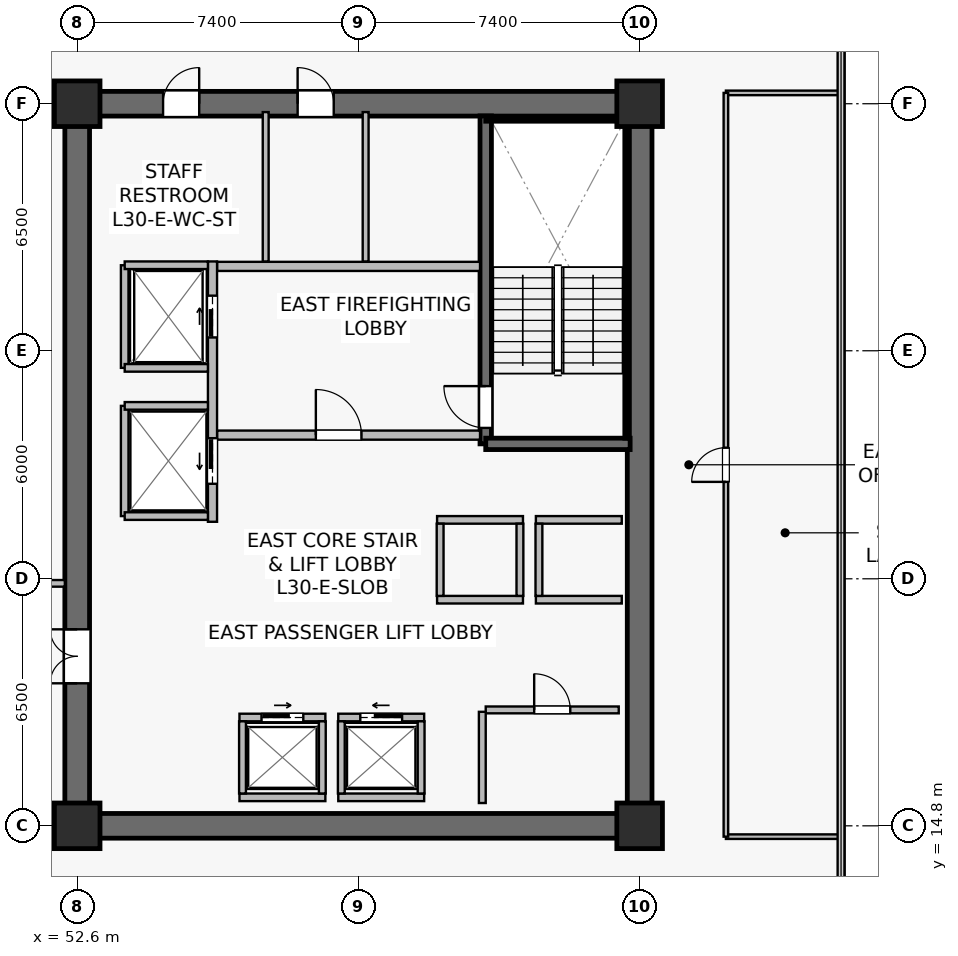
"""IFC4 building model, lengths in metres.
Left out: names, types, materials, properties, quantities, classifications, styles, units other than length and angle.
Written with IfcOpenShell. Run it as: python <this file> out.ifc"""

import sys

from ifc_helpers import new_model, si_unit, direction, frame, frame_2d, origin, origin_2d, place, context, subcontext, project, spatial, rectangle, extrude, source, transform, mapped, element, fill, save


model = new_model("IFC4")
c1 = context("Model", 3, precision=1e-05, world=origin(), true_north=direction((0.0, 1.0)))
c2 = subcontext(c1, "Body", "Model", "MODEL_VIEW")
j1 = project(units=[si_unit("LENGTHUNIT", "METRE"), si_unit("PLANEANGLEUNIT", "RADIAN")], contexts=[c1])
p1 = place(None, origin())
s1 = spatial("IfcSite", under=j1, at=p1, CompositionType="ELEMENT")
p2 = place(p1, origin())
s2 = spatial("IfcBuilding", under=s1, at=p2, CompositionType="ELEMENT")
p3 = place(p2, frame((0.0, 0.0, 125.6)))
s3 = spatial("IfcBuildingStorey", under=s2, at=p3, CompositionType="ELEMENT", Elevation=125.6)
p4 = place(p3, frame((52.275, 14.8, 0.0), z_axis=(0.0, 0.0, 1.0), x_axis=(1.0, 0.0, 0.0)))
e1 = element("IfcWall", 1, at=p4, inside=s3, PredefinedType="SHEAR", context=c2, shape_type="SweptSolid", body=[
    extrude(rectangle(XDim=15.45, YDim=0.65, at=frame_2d((7.725, 0.0))), origin(), (0.0, 0.0, 1.0), 3.79),
])
p5 = place(p3, frame((52.275, 33.8, 0.0), z_axis=(0.0, 0.0, 1.0), x_axis=(1.0, 0.0, 0.0)))
e2 = element("IfcWall", 2, at=p5, inside=s3, PredefinedType="SHEAR", context=c2, shape_type="SweptSolid", body=[
    extrude(rectangle(XDim=15.45, YDim=0.65, at=frame_2d((7.725, 0.0))), origin(), (0.0, 0.0, 1.0), 3.79),
])
p6 = place(p5, frame((6.125, 0.0, 0.0)))
e3 = element("IfcOpeningElement", 3, at=p6, cuts=e2, PredefinedType="OPENING", context=c2, shape_type="SweptSolid", body=[
    extrude(rectangle(XDim=0.95, YDim=2.15, at=frame_2d((0.475, 1.075))), frame((0.0, 0.335, 0.0), z_axis=(0.0, -1.0, 0.0), x_axis=(1.0, 0.0, 0.0)), (0.0, 0.0, 1.0), 0.67),
])
p7 = place(p5, frame((2.585, 0.0, 0.0)))
e4 = element("IfcOpeningElement", 4, at=p7, cuts=e2, PredefinedType="OPENING", context=c2, shape_type="SweptSolid", body=[
    extrude(rectangle(XDim=0.95, YDim=2.15, at=frame_2d((0.475, 1.075))), frame((0.0, 0.335, 0.0), z_axis=(0.0, -1.0, 0.0), x_axis=(1.0, 0.0, 0.0)), (0.0, 0.0, 1.0), 0.67),
])
p8 = place(p3, frame((52.6, 15.125, 0.0), z_axis=(0.0, 0.0, 1.0), x_axis=(0.0, 1.0, 0.0)))
e5 = element("IfcWall", 5, at=p8, inside=s3, PredefinedType="SHEAR", context=c2, shape_type="SweptSolid", body=[
    extrude(rectangle(XDim=18.35, YDim=0.65, at=frame_2d((9.175, 0.0))), origin(), (0.0, 0.0, 1.0), 3.79),
])
p9 = place(p8, frame((3.425, 0.0, 0.0)))
e6 = element("IfcOpeningElement", 6, at=p9, cuts=e5, PredefinedType="OPENING", context=c2, shape_type="SweptSolid", body=[
    extrude(rectangle(XDim=1.42, YDim=2.2, at=frame_2d((0.71, 1.1))), frame((0.0, 0.335, 0.0), z_axis=(0.0, -1.0, 0.0), x_axis=(1.0, 0.0, 0.0)), (0.0, 0.0, 1.0), 0.67),
])
p10 = place(p3, frame((67.4, 15.125, 0.0), z_axis=(0.0, 0.0, 1.0), x_axis=(0.0, 1.0, 0.0)))
e7 = element("IfcWall", 7, at=p10, inside=s3, PredefinedType="SHEAR", context=c2, shape_type="SweptSolid", body=[
    extrude(rectangle(XDim=18.35, YDim=0.65, at=frame_2d((9.175, 0.0))), origin(), (0.0, 0.0, 1.0), 3.79),
])
p11 = place(p3, frame((63.35, 24.85, 0.0), z_axis=(0.0, 0.0, 1.0), x_axis=(0.0, 1.0, 0.0)))
e8 = element("IfcWall", 8, at=p11, inside=s3, PredefinedType="SHEAR", context=c2, shape_type="SweptSolid", body=[
    extrude(rectangle(XDim=8.63, YDim=0.3, at=frame_2d((4.315, 0.0))), origin(), (0.0, 0.0, 1.0), 3.79),
])
p12 = place(p11, frame((0.42, 0.0, 0.0)))
e9 = element("IfcOpeningElement", 9, at=p12, cuts=e8, PredefinedType="OPENING", context=c2, shape_type="SweptSolid", body=[
    extrude(rectangle(XDim=1.1, YDim=2.15, at=frame_2d((0.55, 1.075))), frame((0.0, 0.16, 0.0), z_axis=(0.0, -1.0, 0.0), x_axis=(1.0, 0.0, 0.0)), (0.0, 0.0, 1.0), 0.32),
])
p13 = place(p3, frame((63.35, 24.85, 0.0), z_axis=(0.0, 0.0, 1.0), x_axis=(1.0, 0.0, 0.0)))
e10 = element("IfcWall", 10, at=p13, inside=s3, PredefinedType="SHEAR", context=c2, shape_type="SweptSolid", body=[
    extrude(rectangle(XDim=3.8, YDim=0.3, at=frame_2d((1.9, 0.0))), origin(), (0.0, 0.0, 1.0), 3.79),
])
p14 = place(p3, frame((63.35, 33.4, 0.0), z_axis=(0.0, 0.0, 1.0), x_axis=(1.0, 0.0, 0.0)))
e11 = element("IfcWall", 11, at=p14, inside=s3, PredefinedType="SOLIDWALL", context=c2, shape_type="SweptSolid", body=[
    extrude(rectangle(XDim=3.72, YDim=0.12, at=frame_2d((1.86, 0.0))), origin(), (0.0, 0.0, 1.0), 3.79),
])
p15 = place(p3, frame((67.07, 25.0, 0.0), z_axis=(0.0, 0.0, 1.0), x_axis=(0.0, 1.0, 0.0)))
e12 = element("IfcWall", 12, at=p15, inside=s3, PredefinedType="SOLIDWALL", context=c2, shape_type="SweptSolid", body=[
    extrude(rectangle(XDim=8.32, YDim=0.12, at=frame_2d((4.16, 0.0))), origin(), (0.0, 0.0, 1.0), 3.79),
])
m1 = source(origin(), c2, "Body", "SweptSolid", [
    extrude(rectangle(XDim=1.2, YDim=1.2, at=origin_2d()), origin(), (0.0, 0.0, 1.0), 4.1),
])
for number, where, z_axis, x_axis in (
    (13, (52.6, 14.8, 0.0), (0.0, 0.0, 1.0), (1.0, 0.0, 0.0)),
    (14, (67.4, 14.8, 0.0), (0.0, 0.0, 1.0), (1.0, 0.0, 0.0)),
    (15, (52.6, 33.8, 0.0), (0.0, 0.0, 1.0), (1.0, 0.0, 0.0)),
    (16, (67.4, 33.8, 0.0), (0.0, 0.0, 1.0), (1.0, 0.0, 0.0)),
):
    element("IfcColumn", number, at=place(p3, frame(where, z_axis=z_axis, x_axis=x_axis)), inside=s3, PredefinedType="COLUMN", context=c2, shape_type="MappedRepresentation", body=[
        mapped(m1, transform((0.0, 0.0, 0.0), scale=1.0)),
    ])
p16 = place(p3, frame((56.28, 25.08, 0.0), z_axis=(0.0, 0.0, 1.0), x_axis=(1.0, 0.0, 0.0)))
e17 = element("IfcWall", 17, at=p16, inside=s3, PredefinedType="SOLIDWALL", context=c2, shape_type="SweptSolid", body=[
    extrude(rectangle(XDim=6.92, YDim=0.24, at=frame_2d((3.46, 0.0))), origin(), (0.0, 0.0, 1.0), 3.125),
])
p17 = place(p16, frame((2.6, 0.0, 0.0)))
e18 = element("IfcOpeningElement", 18, at=p17, cuts=e17, PredefinedType="OPENING", context=c2, shape_type="SweptSolid", body=[
    extrude(rectangle(XDim=1.2, YDim=2.16, at=frame_2d((0.6, 1.08))), frame((0.0, 0.13, 0.0), z_axis=(0.0, -1.0, 0.0), x_axis=(1.0, 0.0, 0.0)), (0.0, 0.0, 1.0), 0.26),
])
p18 = place(p3, frame((56.28, 29.52, 0.0), z_axis=(0.0, 0.0, 1.0), x_axis=(1.0, 0.0, 0.0)))
e19 = element("IfcWall", 19, at=p18, inside=s3, PredefinedType="SOLIDWALL", context=c2, shape_type="SweptSolid", body=[
    extrude(rectangle(XDim=6.92, YDim=0.24, at=frame_2d((3.46, 0.0))), origin(), (0.0, 0.0, 1.0), 3.125),
])
p19 = place(p3, frame((56.16, 22.8, 0.0), z_axis=(0.0, 0.0, 1.0), x_axis=(0.0, 1.0, 0.0)))
e20 = element("IfcWall", 20, at=p19, inside=s3, PredefinedType="SOLIDWALL", context=c2, shape_type="SweptSolid", body=[
    extrude(rectangle(XDim=6.85, YDim=0.24, at=frame_2d((3.425, 0.0))), origin(), (0.0, 0.0, 1.0), 2.875),
])
p20 = place(p19, frame((4.85, 0.0, 0.0)))
e21 = element("IfcOpeningElement", 21, at=p20, cuts=e20, PredefinedType="OPENING", context=c2, shape_type="SweptSolid", body=[
    extrude(rectangle(XDim=1.1, YDim=2.22, at=frame_2d((0.55, 1.11))), frame((0.0, 0.13, 0.0), z_axis=(0.0, -1.0, 0.0), x_axis=(1.0, 0.0, 0.0)), (0.0, 0.0, 1.0), 0.26),
])
p21 = place(p19, frame((1.0, 0.0, 0.0)))
e22 = element("IfcOpeningElement", 22, at=p21, cuts=e20, PredefinedType="OPENING", context=c2, shape_type="SweptSolid", body=[
    extrude(rectangle(XDim=1.2, YDim=2.22, at=frame_2d((0.6, 1.11))), frame((0.0, 0.13, 0.0), z_axis=(0.0, -1.0, 0.0), x_axis=(1.0, 0.0, 0.0)), (0.0, 0.0, 1.0), 0.26),
])
p22 = place(p3, frame((59.47, 17.65, 0.0), z_axis=(0.0, 0.0, 1.0), x_axis=(1.0, 0.0, 0.0)))
e23 = element("IfcWall", 23, at=p22, inside=s3, PredefinedType="SOLIDWALL", context=c2, shape_type="SweptSolid", body=[
    extrude(rectangle(XDim=2.26, YDim=0.2, at=frame_2d((1.13, 0.0))), origin(), (0.0, 0.0, 1.0), 3.125),
])
p23 = place(p22, frame((0.58, 0.0, 0.0)))
e24 = element("IfcOpeningElement", 24, at=p23, cuts=e23, PredefinedType="OPENING", context=c2, shape_type="SweptSolid", body=[
    extrude(rectangle(XDim=1.1, YDim=2.22, at=frame_2d((0.55, 1.11))), frame((0.0, 0.11, 0.0), z_axis=(0.0, -1.0, 0.0), x_axis=(1.0, 0.0, 0.0)), (0.0, 0.0, 1.0), 0.22),
])
p24 = place(p3, frame((59.47, 15.55, 0.0), z_axis=(0.0, 0.0, 1.0), x_axis=(1.0, 0.0, 0.0)))
e25 = element("IfcWall", 25, at=p24, inside=s3, PredefinedType="SOLIDWALL", context=c2, shape_type="SweptSolid", body=[
    extrude(rectangle(XDim=2.26, YDim=0.2, at=frame_2d((1.13, 0.0))), origin(), (0.0, 0.0, 1.0), 3.125),
])
for number, where, z_axis, x_axis in (
    (26, (59.55, 15.65, 0.0), (0.0, 0.0, 1.0), (0.0, 1.0, 0.0)),
    (27, (61.65, 15.65, 0.0), (0.0, 0.0, 1.0), (0.0, 1.0, 0.0)),
):
    element("IfcWall", number, at=place(p3, frame(where, z_axis=z_axis, x_axis=x_axis)), inside=s3, PredefinedType="SOLIDWALL", context=c2, shape_type="SweptSolid", body=[
        extrude(rectangle(XDim=1.9, YDim=0.18, at=frame_2d((0.95, 0.0))), origin(), (0.0, 0.0, 1.0), 3.79),
    ])
p25 = place(p3, frame((56.87, 17.65, 0.0), z_axis=(0.0, 0.0, 1.0), x_axis=(1.0, 0.0, 0.0)))
e28 = element("IfcWall", 28, at=p25, inside=s3, PredefinedType="SOLIDWALL", context=c2, shape_type="SweptSolid", body=[
    extrude(rectangle(XDim=2.26, YDim=0.2, at=frame_2d((1.13, 0.0))), origin(), (0.0, 0.0, 1.0), 3.79),
])
p26 = place(p25, frame((0.58, 0.0, 0.0)))
e29 = element("IfcOpeningElement", 29, at=p26, cuts=e28, PredefinedType="OPENING", context=c2, shape_type="SweptSolid", body=[
    extrude(rectangle(XDim=1.1, YDim=2.22, at=frame_2d((0.55, 1.11))), frame((0.0, 0.11, 0.0), z_axis=(0.0, -1.0, 0.0), x_axis=(1.0, 0.0, 0.0)), (0.0, 0.0, 1.0), 0.22),
])
p27 = place(p3, frame((56.87, 15.55, 0.0), z_axis=(0.0, 0.0, 1.0), x_axis=(1.0, 0.0, 0.0)))
e30 = element("IfcWall", 30, at=p27, inside=s3, PredefinedType="SOLIDWALL", context=c2, shape_type="SweptSolid", body=[
    extrude(rectangle(XDim=2.26, YDim=0.2, at=frame_2d((1.13, 0.0))), origin(), (0.0, 0.0, 1.0), 3.79),
])
for number, where, z_axis, x_axis in (
    (31, (56.95, 15.65, 0.0), (0.0, 0.0, 1.0), (0.0, 1.0, 0.0)),
    (32, (59.05, 15.65, 0.0), (0.0, 0.0, 1.0), (0.0, 1.0, 0.0)),
):
    element("IfcWall", number, at=place(p3, frame(where, z_axis=z_axis, x_axis=x_axis)), inside=s3, PredefinedType="SOLIDWALL", context=c2, shape_type="SweptSolid", body=[
        extrude(rectangle(XDim=1.9, YDim=0.18, at=frame_2d((0.95, 0.0))), origin(), (0.0, 0.0, 1.0), 3.79),
    ])
for number, where, z_axis, x_axis in (
    (33, (64.67, 20.75, 0.0), (0.0, 0.0, 1.0), (1.0, 0.0, 0.0)),
    (34, (64.67, 22.85, 0.0), (0.0, 0.0, 1.0), (1.0, 0.0, 0.0)),
):
    element("IfcWall", number, at=place(p3, frame(where, z_axis=z_axis, x_axis=x_axis)), inside=s3, PredefinedType="SOLIDWALL", context=c2, shape_type="SweptSolid", body=[
        extrude(rectangle(XDim=2.26, YDim=0.2, at=frame_2d((1.13, 0.0))), origin(), (0.0, 0.0, 1.0), 3.79),
    ])
p28 = place(p3, frame((64.75, 20.85, 0.0), z_axis=(0.0, 0.0, 1.0), x_axis=(0.0, 1.0, 0.0)))
e35 = element("IfcWall", 35, at=p28, inside=s3, PredefinedType="SOLIDWALL", context=c2, shape_type="SweptSolid", body=[
    extrude(rectangle(XDim=1.9, YDim=0.18, at=frame_2d((0.95, 0.0))), origin(), (0.0, 0.0, 1.0), 3.79),
])
for number, where, z_axis, x_axis in (
    (36, (62.07, 20.75, 0.0), (0.0, 0.0, 1.0), (1.0, 0.0, 0.0)),
    (37, (62.07, 22.85, 0.0), (0.0, 0.0, 1.0), (1.0, 0.0, 0.0)),
):
    element("IfcWall", number, at=place(p3, frame(where, z_axis=z_axis, x_axis=x_axis)), inside=s3, PredefinedType="SOLIDWALL", context=c2, shape_type="SweptSolid", body=[
        extrude(rectangle(XDim=2.26, YDim=0.2, at=frame_2d((1.13, 0.0))), origin(), (0.0, 0.0, 1.0), 3.79),
    ])
for number, where, z_axis, x_axis in (
    (38, (62.15, 20.85, 0.0), (0.0, 0.0, 1.0), (0.0, 1.0, 0.0)),
    (39, (64.25, 20.85, 0.0), (0.0, 0.0, 1.0), (0.0, 1.0, 0.0)),
):
    element("IfcWall", number, at=place(p3, frame(where, z_axis=z_axis, x_axis=x_axis)), inside=s3, PredefinedType="SOLIDWALL", context=c2, shape_type="SweptSolid", body=[
        extrude(rectangle(XDim=1.9, YDim=0.18, at=frame_2d((0.95, 0.0))), origin(), (0.0, 0.0, 1.0), 3.79),
    ])
p29 = place(p3, frame((53.85, 26.85, 0.0), z_axis=(0.0, 0.0, 1.0), x_axis=(0.0, 1.0, 0.0)))
e40 = element("IfcWall", 40, at=p29, inside=s3, PredefinedType="SOLIDWALL", context=c2, shape_type="SweptSolid", body=[
    extrude(rectangle(XDim=2.7, YDim=0.2, at=frame_2d((1.35, 0.0))), origin(), (0.0, 0.0, 1.0), 3.79),
])
p30 = place(p3, frame((53.85, 29.55, 0.0), z_axis=(0.0, 0.0, 1.0), x_axis=(1.0, 0.0, 0.0)))
e41 = element("IfcWall", 41, at=p30, inside=s3, PredefinedType="SOLIDWALL", context=c2, shape_type="SweptSolid", body=[
    extrude(rectangle(XDim=2.19, YDim=0.2, at=frame_2d((1.095, 0.0))), origin(), (0.0, 0.0, 1.0), 3.79),
])
p31 = place(p3, frame((53.85, 26.85, 0.0), z_axis=(0.0, 0.0, 1.0), x_axis=(1.0, 0.0, 0.0)))
e42 = element("IfcWall", 42, at=p31, inside=s3, PredefinedType="SOLIDWALL", context=c2, shape_type="SweptSolid", body=[
    extrude(rectangle(XDim=2.19, YDim=0.2, at=frame_2d((1.095, 0.0))), origin(), (0.0, 0.0, 1.0), 3.187),
])
p32 = place(p3, frame((53.85, 22.95, 0.0), z_axis=(0.0, 0.0, 1.0), x_axis=(0.0, 1.0, 0.0)))
e43 = element("IfcWall", 43, at=p32, inside=s3, PredefinedType="SOLIDWALL", context=c2, shape_type="SweptSolid", body=[
    extrude(rectangle(XDim=2.9, YDim=0.2, at=frame_2d((1.45, 0.0))), origin(), (0.0, 0.0, 1.0), 2.875),
])
for number, where, z_axis, x_axis in (
    (44, (53.85, 25.85, 0.0), (0.0, 0.0, 1.0), (1.0, 0.0, 0.0)),
    (45, (53.85, 22.95, 0.0), (0.0, 0.0, 1.0), (1.0, 0.0, 0.0)),
):
    element("IfcWall", number, at=place(p3, frame(where, z_axis=z_axis, x_axis=x_axis)), inside=s3, PredefinedType="SOLIDWALL", context=c2, shape_type="SweptSolid", body=[
        extrude(rectangle(XDim=2.19, YDim=0.2, at=frame_2d((1.095, 0.0))), origin(), (0.0, 0.0, 1.0), 3.79),
    ])
p33 = place(p3, frame((63.35, 17.85, 0.0), z_axis=(0.0, 0.0, 1.0), x_axis=(1.0, 0.0, 0.0)))
e46 = element("IfcWall", 46, at=p33, inside=s3, PredefinedType="SOLIDWALL", context=c2, shape_type="SweptSolid", body=[
    extrude(rectangle(XDim=3.5, YDim=0.18, at=frame_2d((1.75, 0.0))), origin(), (0.0, 0.0, 1.0), 3.79),
])
p34 = place(p33, frame((1.275, 0.0, 0.0)))
e47 = element("IfcOpeningElement", 47, at=p34, cuts=e46, PredefinedType="OPENING", context=c2, shape_type="SweptSolid", body=[
    extrude(rectangle(XDim=0.95, YDim=2.15, at=frame_2d((0.475, 1.075))), frame((0.0, 0.1, 0.0), z_axis=(0.0, -1.0, 0.0), x_axis=(1.0, 0.0, 0.0)), (0.0, 0.0, 1.0), 0.2),
])
p35 = place(p3, frame((63.26, 15.4, 0.0), z_axis=(0.0, 0.0, 1.0), x_axis=(0.0, 1.0, 0.0)))
e48 = element("IfcWall", 48, at=p35, inside=s3, PredefinedType="SOLIDWALL", context=c2, shape_type="SweptSolid", body=[
    extrude(rectangle(XDim=2.4, YDim=0.18, at=frame_2d((1.2, 0.0))), origin(), (0.0, 0.0, 1.0), 3.79),
])
p36 = place(p3, frame((60.19, 29.65, 0.0), z_axis=(0.0, 0.0, 1.0), x_axis=(0.0, 1.0, 0.0)))
e49 = element("IfcWall", 49, at=p36, inside=s3, PredefinedType="PLUMBINGWALL", context=c2, shape_type="SweptSolid", body=[
    extrude(rectangle(XDim=3.93, YDim=0.155, at=frame_2d((1.965, 0.0))), origin(), (0.0, 0.0, 1.0), 3.125),
])
p37 = place(p3, frame((57.56, 29.65, 0.0), z_axis=(0.0, 0.0, 1.0), x_axis=(0.0, 1.0, 0.0)))
e50 = element("IfcWall", 50, at=p37, inside=s3, PredefinedType="PLUMBINGWALL", context=c2, shape_type="SweptSolid", body=[
    extrude(rectangle(XDim=3.93, YDim=0.155, at=frame_2d((1.965, 0.0))), origin(), (0.0, 0.0, 1.0), 3.79),
])
p38 = place(p3, frame((48.3, 34.26, 0.0), z_axis=(0.0, 0.0, 1.0), x_axis=(1.0, 0.0, 0.0)))
e51 = element("IfcWall", 51, at=p38, inside=s3, PredefinedType="PARTITIONING", context=c2, shape_type="SweptSolid", body=[
    extrude(rectangle(XDim=3.975, YDim=0.175, at=frame_2d((1.987, 0.0))), origin(), (0.0, 0.0, 1.0), 3.475),
])
p39 = place(p3, frame((48.3, 21.18, 0.0), z_axis=(0.0, 0.0, 1.0), x_axis=(1.0, 0.0, 0.0)))
e52 = element("IfcWall", 52, at=p39, inside=s3, PredefinedType="PARTITIONING", context=c2, shape_type="SweptSolid", body=[
    extrude(rectangle(XDim=3.975, YDim=0.175, at=frame_2d((1.987, 0.0))), origin(), (0.0, 0.0, 1.0), 3.79),
])
p40 = place(p39, frame((1.35, 0.0, 0.0)))
e53 = element("IfcOpeningElement", 53, at=p40, cuts=e52, PredefinedType="OPENING", context=c2, shape_type="SweptSolid", body=[
    extrude(rectangle(XDim=0.95, YDim=2.15, at=frame_2d((0.475, 1.075))), frame((0.0, 0.098, 0.0), z_axis=(0.0, -1.0, 0.0), x_axis=(1.0, 0.0, 0.0)), (0.0, 0.0, 1.0), 0.195),
])
for number, where, z_axis, x_axis in (
    (54, (69.67, 14.515, 0.0), (0.0, 0.0, 1.0), (1.0, 0.0, 0.0)),
    (55, (69.67, 34.085, 0.0), (0.0, 0.0, 1.0), (1.0, 0.0, 0.0)),
):
    element("IfcWall", number, at=place(p3, frame(where, z_axis=z_axis, x_axis=x_axis)), inside=s3, PredefinedType="PARTITIONING", context=c2, shape_type="SweptSolid", body=[
        extrude(rectangle(XDim=3.02, YDim=0.12, at=frame_2d((1.51, 0.0))), origin(), (0.0, 0.0, 1.0), 3.79),
    ])
p41 = place(p3, frame((69.67, 14.515, 0.0), z_axis=(0.0, 0.0, 1.0), x_axis=(0.0, 1.0, 0.0)))
e56 = element("IfcWall", 56, at=p41, inside=s3, PredefinedType="PARTITIONING", context=c2, shape_type="SweptSolid", body=[
    extrude(rectangle(XDim=19.57, YDim=0.12, at=frame_2d((9.785, 0.0))), origin(), (0.0, 0.0, 1.0), 3.79),
])
p42 = place(p41, frame((9.335, 0.0, 0.0)))
e57 = element("IfcOpeningElement", 57, at=p42, cuts=e56, PredefinedType="OPENING", context=c2, shape_type="SweptSolid", body=[
    extrude(rectangle(XDim=0.9, YDim=2.1, at=frame_2d((0.45, 1.05))), frame((0.0, 0.07, 0.0), z_axis=(0.0, -1.0, 0.0), x_axis=(1.0, 0.0, 0.0)), (0.0, 0.0, 1.0), 0.14),
])
m2 = source(origin(), c2, "Body", "SweptSolid", [
    extrude(rectangle(XDim=1.1, YDim=2.15, at=frame_2d((0.55, 1.075))), frame((0.0, 0.025, 0.0), z_axis=(0.0, -1.0, 0.0), x_axis=(1.0, 0.0, 0.0)), (0.0, 0.0, 1.0), 0.05),
])
p43 = place(p12, origin())
e58 = element("IfcDoor", 58, at=p43, inside=s3, OperationType="SINGLE_SWING_RIGHT", PredefinedType="DOOR", context=c2, shape_type="MappedRepresentation", body=[
    mapped(m2, transform((0.0, 0.0, 0.0), scale=1.0)),
])
fill(e9, e58)
m3 = source(origin(), c2, "Body", "SweptSolid", [
    extrude(rectangle(XDim=1.2, YDim=2.16, at=frame_2d((0.6, 1.08))), frame((0.0, 0.025, 0.0), z_axis=(0.0, -1.0, 0.0), x_axis=(1.0, 0.0, 0.0)), (0.0, 0.0, 1.0), 0.05),
])
p44 = place(p17, origin())
e59 = element("IfcDoor", 59, at=p44, inside=s3, OperationType="SINGLE_SWING_LEFT", PredefinedType="DOOR", context=c2, shape_type="MappedRepresentation", body=[
    mapped(m3, transform((0.0, 0.0, 0.0), scale=1.0)),
])
fill(e18, e59)
m4 = source(origin(), c2, "Body", "SweptSolid", [
    extrude(rectangle(XDim=1.1, YDim=2.22, at=frame_2d((0.55, 1.11))), frame((0.0, 0.025, 0.0), z_axis=(0.0, -1.0, 0.0), x_axis=(1.0, 0.0, 0.0)), (0.0, 0.0, 1.0), 0.05),
])
p45 = place(p23, origin())
e60 = element("IfcDoor", 60, at=p45, inside=s3, OperationType="SLIDING_TO_LEFT", PredefinedType="USERDEFINED", context=c2, shape_type="MappedRepresentation", body=[
    mapped(m4, transform((0.0, 0.0, 0.0), scale=1.0)),
])
fill(e24, e60)
p46 = place(p26, origin())
e61 = element("IfcDoor", 61, at=p46, inside=s3, OperationType="SLIDING_TO_RIGHT", PredefinedType="USERDEFINED", context=c2, shape_type="MappedRepresentation", body=[
    mapped(m4, transform((0.0, 0.0, 0.0), scale=1.0)),
])
fill(e29, e61)
p47 = place(p20, origin())
e62 = element("IfcDoor", 62, at=p47, inside=s3, OperationType="SLIDING_TO_RIGHT", PredefinedType="USERDEFINED", context=c2, shape_type="MappedRepresentation", body=[
    mapped(m4, transform((0.0, 0.0, 0.0), scale=1.0)),
])
fill(e21, e62)
m5 = source(origin(), c2, "Body", "SweptSolid", [
    extrude(rectangle(XDim=1.2, YDim=2.22, at=frame_2d((0.6, 1.11))), frame((0.0, 0.025, 0.0), z_axis=(0.0, -1.0, 0.0), x_axis=(1.0, 0.0, 0.0)), (0.0, 0.0, 1.0), 0.05),
])
p48 = place(p21, origin())
e63 = element("IfcDoor", 63, at=p48, inside=s3, OperationType="SLIDING_TO_LEFT", PredefinedType="USERDEFINED", context=c2, shape_type="MappedRepresentation", body=[
    mapped(m5, transform((0.0, 0.0, 0.0), scale=1.0)),
])
fill(e22, e63)
m6 = source(origin(), c2, "Body", "SweptSolid", [
    extrude(rectangle(XDim=0.95, YDim=2.15, at=frame_2d((0.475, 1.075))), frame((0.0, 0.025, 0.0), z_axis=(0.0, -1.0, 0.0), x_axis=(1.0, 0.0, 0.0)), (0.0, 0.0, 1.0), 0.05),
])
p49 = place(p34, origin())
e64 = element("IfcDoor", 64, at=p49, inside=s3, OperationType="SINGLE_SWING_LEFT", PredefinedType="DOOR", context=c2, shape_type="MappedRepresentation", body=[
    mapped(m6, transform((0.0, 0.0, 0.0), scale=1.0)),
])
fill(e47, e64)
m7 = source(origin(), c2, "Body", "SweptSolid", [
    extrude(rectangle(XDim=1.42, YDim=2.2, at=frame_2d((0.71, 1.1))), frame((0.0, 0.025, 0.0), z_axis=(0.0, -1.0, 0.0), x_axis=(1.0, 0.0, 0.0)), (0.0, 0.0, 1.0), 0.05),
])
p50 = place(p9, origin())
e65 = element("IfcDoor", 65, at=p50, inside=s3, OperationType="DOUBLE_DOOR_SINGLE_SWING", PredefinedType="DOOR", context=c2, shape_type="MappedRepresentation", body=[
    mapped(m7, transform((0.0, 0.0, 0.0), scale=1.0)),
])
fill(e6, e65)
p51 = place(p6, origin())
e66 = element("IfcDoor", 66, at=p51, inside=s3, OperationType="SINGLE_SWING_LEFT", PredefinedType="DOOR", context=c2, shape_type="MappedRepresentation", body=[
    mapped(m6, transform((0.0, 0.0, 0.0), scale=1.0)),
])
fill(e3, e66)
p52 = place(p7, origin())
e67 = element("IfcDoor", 67, at=p52, inside=s3, OperationType="SINGLE_SWING_RIGHT", PredefinedType="DOOR", context=c2, shape_type="MappedRepresentation", body=[
    mapped(m6, transform((0.0, 0.0, 0.0), scale=1.0)),
])
fill(e4, e67)
m8 = source(origin(), c2, "Body", "SweptSolid", [
    extrude(rectangle(XDim=0.9, YDim=2.1, at=frame_2d((0.45, 1.05))), frame((0.0, 0.025, 0.0), z_axis=(0.0, -1.0, 0.0), x_axis=(1.0, 0.0, 0.0)), (0.0, 0.0, 1.0), 0.05),
])
p53 = place(p42, origin())
e68 = element("IfcDoor", 68, at=p53, inside=s3, OperationType="SINGLE_SWING_LEFT", PredefinedType="DOOR", context=c2, shape_type="MappedRepresentation", body=[
    mapped(m8, transform((0.0, 0.0, 0.0), scale=1.0)),
])
fill(e57, e68)
save(model, sys.argv[1])
